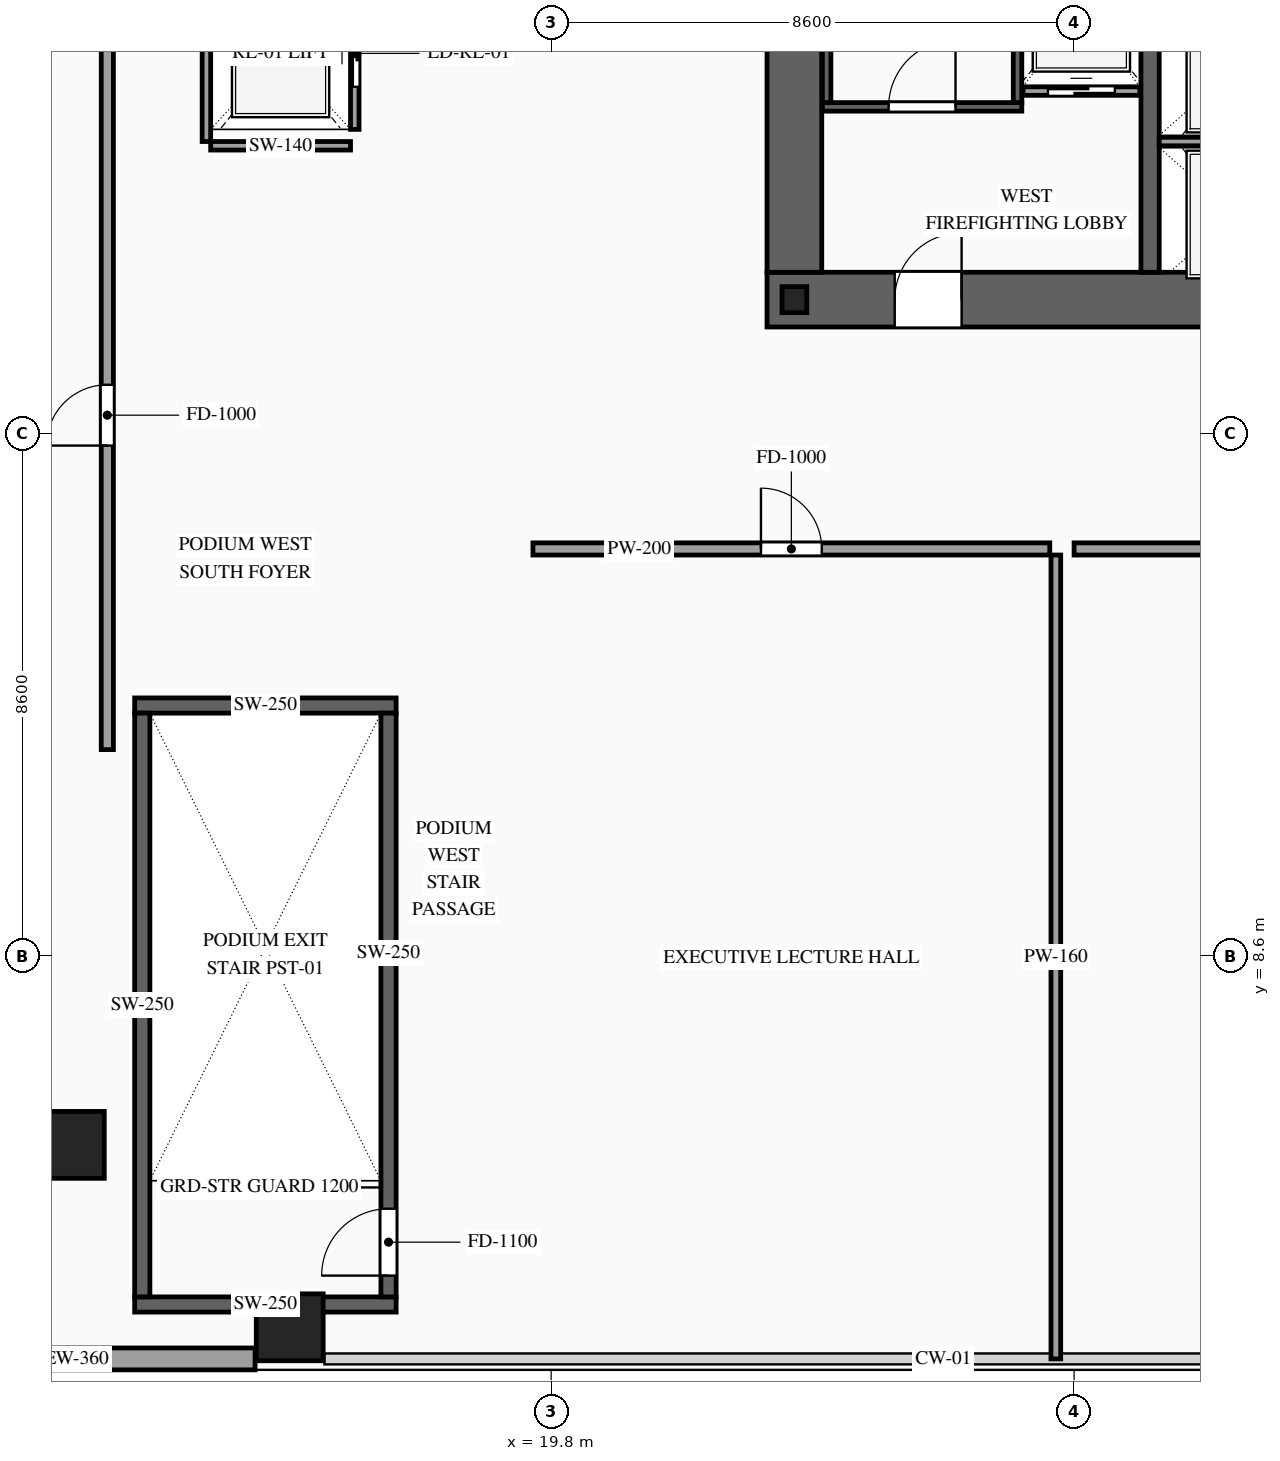
"""IFC4 building model, lengths in metres.
Left out: names, types, materials, properties, quantities, classifications, styles, units other than length and angle.
Written with IfcOpenShell. Run it as: python <this file> out.ifc"""

import sys

from ifc_helpers import new_model, si_unit, direction, frame, frame_2d, origin, origin_2d, place, context, subcontext, project, spatial, rectangle, i_section, extrude, source, transform, mapped, element, fill, save


model = new_model("IFC4")
c1 = context("Model", 3, precision=1e-05, world=origin(), true_north=direction((0.0, 1.0)))
c2 = subcontext(c1, "Body", "Model", "MODEL_VIEW")
j1 = project(units=[si_unit("LENGTHUNIT", "METRE"), si_unit("PLANEANGLEUNIT", "RADIAN")], contexts=[c1])
p1 = place(None, origin())
s1 = spatial("IfcSite", under=j1, at=p1, CompositionType="ELEMENT")
p2 = place(p1, origin())
s2 = spatial("IfcBuilding", under=s1, at=p2, CompositionType="ELEMENT")
p3 = place(p2, frame((0.0, 0.0, 25.8)))
s3 = spatial("IfcBuildingStorey", under=s2, at=p3, CompositionType="ELEMENT", Elevation=25.8)
p4 = place(p3, frame((23.35, 19.4, 0.0), z_axis=(0.0, 0.0, 1.0), x_axis=(1.0, 0.0, 0.0)))
e1 = element("IfcWall", 1, at=p4, inside=s3, PredefinedType="SHEAR", context=c2, shape_type="SweptSolid", body=[
    extrude(rectangle(XDim=27.3, YDim=0.9, at=frame_2d((13.65, 0.0))), origin(), (0.0, 0.0, 1.0), 4.8),
])
p5 = place(p4, frame((2.1, 0.0, 0.0)))
e2 = element("IfcOpeningElement", 2, at=p5, cuts=e1, PredefinedType="OPENING", context=c2, shape_type="SweptSolid", body=[
    extrude(rectangle(XDim=1.1, YDim=2.2, at=frame_2d((0.55, 1.1))), frame((0.0, 0.465, 0.0), z_axis=(0.0, -1.0, 0.0), x_axis=(1.0, 0.0, 0.0)), (0.0, 0.0, 1.0), 0.93),
])
p6 = place(p4, frame((10.0, 0.0, 0.0)))
e3 = element("IfcOpeningElement", 3, at=p6, cuts=e1, PredefinedType="OPENING", context=c2, shape_type="SweptSolid", body=[
    extrude(rectangle(XDim=1.1, YDim=2.2, at=frame_2d((0.55, 1.1))), frame((0.0, 0.465, 0.0), z_axis=(0.0, -1.0, 0.0), x_axis=(1.0, 0.0, 0.0)), (0.0, 0.0, 1.0), 0.93),
])
p7 = place(p4, frame((23.2, 0.0, 0.0)))
e4 = element("IfcOpeningElement", 4, at=p7, cuts=e1, PredefinedType="OPENING", context=c2, shape_type="SweptSolid", body=[
    extrude(rectangle(XDim=1.1, YDim=2.2, at=frame_2d((0.55, 1.1))), frame((0.0, 0.465, 0.0), z_axis=(0.0, -1.0, 0.0), x_axis=(1.0, 0.0, 0.0)), (0.0, 0.0, 1.0), 0.93),
])
p8 = place(p4, frame((19.82, 0.0, 0.0)))
e5 = element("IfcOpeningElement", 5, at=p8, cuts=e1, PredefinedType="OPENING", context=c2, shape_type="SweptSolid", body=[
    extrude(rectangle(XDim=0.9, YDim=2.15, at=frame_2d((0.45, 1.075))), frame((0.0, 0.465, 0.0), z_axis=(0.0, -1.0, 0.0), x_axis=(1.0, 0.0, 0.0)), (0.0, 0.0, 1.0), 0.93),
])
p9 = place(p4, frame((18.38, 0.0, 0.0)))
e6 = element("IfcOpeningElement", 6, at=p9, cuts=e1, PredefinedType="OPENING", context=c2, shape_type="SweptSolid", body=[
    extrude(rectangle(XDim=0.9, YDim=2.15, at=frame_2d((0.45, 1.075))), frame((0.0, 0.465, 0.0), z_axis=(0.0, -1.0, 0.0), x_axis=(1.0, 0.0, 0.0)), (0.0, 0.0, 1.0), 0.93),
])
m1 = source(origin(), c2, "Body", "SweptSolid", [
    extrude(rectangle(XDim=11.9, YDim=0.9, at=frame_2d((5.95, 0.0))), origin(), (0.0, 0.0, 1.0), 4.8),
])
p10 = place(p3, frame((23.8, 19.85, 0.0), z_axis=(0.0, 0.0, 1.0), x_axis=(0.0, 1.0, 0.0)))
e7 = element("IfcWall", 7, at=p10, inside=s3, PredefinedType="SHEAR", context=c2, shape_type="MappedRepresentation", body=[
    mapped(m1, transform((0.0, 0.0, 0.0), scale=1.0)),
])
m2 = source(origin(), c2, "Body", "SweptSolid", [
    extrude(rectangle(XDim=11.9, YDim=0.3, at=frame_2d((5.95, 0.0))), origin(), (0.0, 0.0, 1.0), 4.8),
])
p11 = place(p3, frame((29.65, 19.85, 0.0), z_axis=(0.0, 0.0, 1.0), x_axis=(0.0, 1.0, 0.0)))
e8 = element("IfcWall", 8, at=p11, inside=s3, PredefinedType="SOLIDWALL", context=c2, shape_type="MappedRepresentation", body=[
    mapped(m2, transform((0.0, 0.0, 0.0), scale=1.0)),
])
m3 = source(origin(), c2, "Body", "SweptSolid", [
    extrude(i_section(OverallWidth=0.407, OverallDepth=0.428, WebThickness=0.02, FlangeThickness=0.035, at=origin_2d()), origin(), (0.0, 0.0, 1.0), 4.8),
])
p12 = place(p3, frame((23.8, 19.4, 0.0), z_axis=(0.0, 0.0, 1.0), x_axis=(1.0, 0.0, 0.0)))
e9 = element("IfcColumn", 9, at=p12, inside=s3, PredefinedType="COLUMN", context=c2, shape_type="MappedRepresentation", body=[
    mapped(m3, transform((0.0, 0.0, 0.0), scale=1.0)),
])
m4 = source(origin(), c2, "Body", "SweptSolid", [
    extrude(rectangle(XDim=1.1, YDim=1.1, at=origin_2d()), origin(), (0.0, 0.0, 1.0), 4.8),
])
for number, where, z_axis, x_axis in (
    (10, (11.9, 5.5, 0.0), (0.0, 0.0, 1.0), (1.0, 0.0, 0.0)),
    (11, (15.5, 2.5, 0.0), (0.0, 0.0, 1.0), (1.0, 0.0, 0.0)),
):
    element("IfcColumn", number, at=place(p3, frame(where, z_axis=z_axis, x_axis=x_axis)), inside=s3, PredefinedType="COLUMN", context=c2, shape_type="MappedRepresentation", body=[
        mapped(m4, transform((0.0, 0.0, 0.0), scale=1.0)),
    ])
p13 = place(p3, frame((2.0, 1.98, 0.0), z_axis=(0.0, 0.0, 1.0), x_axis=(1.0, 0.0, 0.0)))
e12 = element("IfcWall", 12, at=p13, inside=s3, PredefinedType="SOLIDWALL", context=c2, shape_type="SweptSolid", body=[
    extrude(rectangle(XDim=12.93, YDim=0.36, at=frame_2d((6.465, 0.0))), origin(), (0.0, 0.0, 1.0), 4.5),
])
p14 = place(p13, frame((4.4, 0.0, 0.85)))
e13 = element("IfcOpeningElement", 13, at=p14, cuts=e12, PredefinedType="OPENING", context=c2, shape_type="SweptSolid", body=[
    extrude(rectangle(XDim=2.4, YDim=2.4, at=frame_2d((1.2, 1.2))), frame((0.0, 0.195, 0.0), z_axis=(0.0, -1.0, 0.0), x_axis=(1.0, 0.0, 0.0)), (0.0, 0.0, 1.0), 0.39),
])
p15 = place(p3, frame((27.56, 22.83, 0.0), z_axis=(0.0, 0.0, 1.0), x_axis=(1.0, 0.0, 0.0)))
e14 = element("IfcWall", 14, at=p15, inside=s3, PredefinedType="SOLIDWALL", context=c2, shape_type="SweptSolid", body=[
    extrude(rectangle(XDim=1.92, YDim=0.14, at=frame_2d((0.96, 0.0))), origin(), (0.0, 0.0, 1.0), 4.5),
])
p16 = place(p15, frame((0.41, 0.0, 0.0)))
e15 = element("IfcOpeningElement", 15, at=p16, cuts=e14, PredefinedType="OPENING", context=c2, shape_type="SweptSolid", body=[
    extrude(rectangle(XDim=1.1, YDim=2.2, at=frame_2d((0.55, 1.1))), frame((0.0, 0.085, 0.0), z_axis=(0.0, -1.0, 0.0), x_axis=(1.0, 0.0, 0.0)), (0.0, 0.0, 1.0), 0.17),
])
m5 = source(origin(), c2, "Body", "SweptSolid", [
    extrude(rectangle(XDim=2.5, YDim=0.14, at=frame_2d((1.25, 0.0))), origin(), (0.0, 0.0, 1.0), 4.5),
])
p17 = place(p3, frame((29.8, 22.0, 0.0), z_axis=(0.0, 0.0, 1.0), x_axis=(1.0, 0.0, 0.0)))
e16 = element("IfcWall", 16, at=p17, inside=s3, PredefinedType="SOLIDWALL", context=c2, shape_type="MappedRepresentation", body=[
    mapped(m5, transform((0.0, 0.0, 0.0), scale=1.0)),
])
p18 = place(p3, frame((16.57, 22.2, 0.0), z_axis=(0.0, 0.0, 1.0), x_axis=(0.0, 1.0, 0.0)))
e17 = element("IfcWall", 17, at=p18, inside=s3, PredefinedType="SOLIDWALL", context=c2, shape_type="SweptSolid", body=[
    extrude(rectangle(XDim=2.5, YDim=0.14, at=frame_2d((1.25, 0.0))), origin(), (0.0, 0.0, 1.0), 4.5),
])
p19 = place(p18, frame((0.7, 0.0, 0.0)))
e18 = element("IfcOpeningElement", 18, at=p19, cuts=e17, PredefinedType="OPENING", context=c2, shape_type="SweptSolid", body=[
    extrude(rectangle(XDim=1.1, YDim=2.2, at=frame_2d((0.55, 1.1))), frame((0.0, 0.085, 0.0), z_axis=(0.0, -1.0, 0.0), x_axis=(1.0, 0.0, 0.0)), (0.0, 0.0, 1.0), 0.17),
])
m6 = source(origin(), c2, "Body", "SweptSolid", [
    extrude(rectangle(XDim=5.8, YDim=0.14, at=frame_2d((2.9, 0.0))), origin(), (0.0, 0.0, 1.0), 4.5),
])
p20 = place(p3, frame((14.13, 22.0, 0.0), z_axis=(0.0, 0.0, 1.0), x_axis=(0.0, 1.0, 0.0)))
e19 = element("IfcWall", 19, at=p20, inside=s3, PredefinedType="SOLIDWALL", context=c2, shape_type="MappedRepresentation", body=[
    mapped(m6, transform((0.0, 0.0, 0.0), scale=1.0)),
])
m7 = source(origin(), c2, "Body", "SweptSolid", [
    extrude(rectangle(XDim=2.3, YDim=0.14, at=frame_2d((1.15, 0.0))), origin(), (0.0, 0.0, 1.0), 4.5),
])
p21 = place(p3, frame((14.2, 21.93, 0.0), z_axis=(0.0, 0.0, 1.0), x_axis=(1.0, 0.0, 0.0)))
e20 = element("IfcWall", 20, at=p21, inside=s3, PredefinedType="SOLIDWALL", context=c2, shape_type="MappedRepresentation", body=[
    mapped(m7, transform((0.0, 0.0, 0.0), scale=1.0)),
])
p22 = place(p3, frame((24.26, 22.57, 0.0), z_axis=(0.0, 0.0, 1.0), x_axis=(1.0, 0.0, 0.0)))
e21 = element("IfcWall", 21, at=p22, inside=s3, PredefinedType="SOLIDWALL", context=c2, shape_type="SweptSolid", body=[
    extrude(rectangle(XDim=3.28, YDim=0.14, at=frame_2d((1.64, 0.0))), origin(), (0.0, 0.0, 1.0), 4.5),
])
p23 = place(p22, frame((1.09, 0.0, 0.0)))
e22 = element("IfcOpeningElement", 22, at=p23, cuts=e21, PredefinedType="OPENING", context=c2, shape_type="SweptSolid", body=[
    extrude(rectangle(XDim=1.1, YDim=2.2, at=frame_2d((0.55, 1.1))), frame((0.0, 0.085, 0.0), z_axis=(0.0, -1.0, 0.0), x_axis=(1.0, 0.0, 0.0)), (0.0, 0.0, 1.0), 0.17),
])
m8 = source(origin(), c2, "Body", "SweptSolid", [
    extrude(rectangle(XDim=8.94, YDim=0.14, at=frame_2d((4.47, 0.0))), origin(), (0.0, 0.0, 1.0), 4.5),
])
for number, where, z_axis, x_axis in (
    (23, (24.33, 22.64, 0.0), (0.0, 0.0, 1.0), (0.0, 1.0, 0.0)),
    (24, (27.47, 22.64, 0.0), (0.0, 0.0, 1.0), (0.0, 1.0, 0.0)),
):
    element("IfcWall", number, at=place(p3, frame(where, z_axis=z_axis, x_axis=x_axis)), inside=s3, PredefinedType="SOLIDWALL", context=c2, shape_type="MappedRepresentation", body=[
        mapped(m8, transform((0.0, 0.0, 0.0), scale=1.0)),
    ])
m9 = source(origin(), c2, "Body", "SweptSolid", [
    extrude(rectangle(XDim=4.3, YDim=0.25, at=frame_2d((2.15, 0.0))), origin(), (0.0, 0.0, 1.0), 4.5),
])
for number, where, z_axis, x_axis in (
    (25, (12.95, 2.875, 0.0), (0.0, 0.0, 1.0), (1.0, 0.0, 0.0)),
    (26, (12.95, 12.725, 0.0), (0.0, 0.0, 1.0), (1.0, 0.0, 0.0)),
):
    element("IfcWall", number, at=place(p3, frame(where, z_axis=z_axis, x_axis=x_axis)), inside=s3, PredefinedType="SOLIDWALL", context=c2, shape_type="MappedRepresentation", body=[
        mapped(m9, transform((0.0, 0.0, 0.0), scale=1.0)),
    ])
m10 = source(origin(), c2, "Body", "SweptSolid", [
    extrude(rectangle(XDim=9.6, YDim=0.25, at=frame_2d((4.8, 0.0))), origin(), (0.0, 0.0, 1.0), 4.5),
])
p24 = place(p3, frame((13.075, 3.0, 0.0), z_axis=(0.0, 0.0, 1.0), x_axis=(0.0, 1.0, 0.0)))
e27 = element("IfcWall", 27, at=p24, inside=s3, PredefinedType="SOLIDWALL", context=c2, shape_type="MappedRepresentation", body=[
    mapped(m10, transform((0.0, 0.0, 0.0), scale=1.0)),
])
p25 = place(p3, frame((17.125, 3.0, 0.0), z_axis=(0.0, 0.0, 1.0), x_axis=(0.0, 1.0, 0.0)))
e28 = element("IfcWall", 28, at=p25, inside=s3, PredefinedType="SOLIDWALL", context=c2, shape_type="SweptSolid", body=[
    extrude(rectangle(XDim=9.6, YDim=0.25, at=frame_2d((4.8, 0.0))), origin(), (0.0, 0.0, 1.0), 4.5),
])
p26 = place(p25, frame((0.35, 0.0, 0.0)))
e29 = element("IfcOpeningElement", 29, at=p26, cuts=e28, PredefinedType="OPENING", context=c2, shape_type="SweptSolid", body=[
    extrude(rectangle(XDim=1.1, YDim=2.2, at=frame_2d((0.55, 1.1))), frame((0.0, 0.14, 0.0), z_axis=(0.0, -1.0, 0.0), x_axis=(1.0, 0.0, 0.0)), (0.0, 0.0, 1.0), 0.28),
])
p27 = place(p3, frame((19.5, 15.3, 0.0), z_axis=(0.0, 0.0, 1.0), x_axis=(1.0, 0.0, 0.0)))
e30 = element("IfcWall", 30, at=p27, inside=s3, PredefinedType="PARTITIONING", context=c2, shape_type="SweptSolid", body=[
    extrude(rectangle(XDim=8.5, YDim=0.2, at=frame_2d((4.25, 0.0))), origin(), (0.0, 0.0, 1.0), 4.5),
])
p28 = place(p27, frame((3.75, 0.0, 0.0)))
e31 = element("IfcOpeningElement", 31, at=p28, cuts=e30, PredefinedType="OPENING", context=c2, shape_type="SweptSolid", body=[
    extrude(rectangle(XDim=1.0, YDim=2.2, at=frame_2d((0.5, 1.1))), frame((0.0, 0.115, 0.0), z_axis=(0.0, -1.0, 0.0), x_axis=(1.0, 0.0, 0.0)), (0.0, 0.0, 1.0), 0.23),
])
m11 = source(origin(), c2, "Body", "SweptSolid", [
    extrude(rectangle(XDim=13.22, YDim=0.16, at=frame_2d((6.61, 0.0))), origin(), (0.0, 0.0, 1.0), 4.5),
])
p29 = place(p3, frame((28.1, 1.98, 0.0), z_axis=(0.0, 0.0, 1.0), x_axis=(0.0, 1.0, 0.0)))
e32 = element("IfcWall", 32, at=p29, inside=s3, PredefinedType="PARTITIONING", context=c2, shape_type="MappedRepresentation", body=[
    mapped(m11, transform((0.0, 0.0, 0.0), scale=1.0)),
])
p30 = place(p3, frame((28.4, 15.3, 0.0), z_axis=(0.0, 0.0, 1.0), x_axis=(1.0, 0.0, 0.0)))
e33 = element("IfcWall", 33, at=p30, inside=s3, PredefinedType="PARTITIONING", context=c2, shape_type="SweptSolid", body=[
    extrude(rectangle(XDim=8.4, YDim=0.2, at=frame_2d((4.2, 0.0))), origin(), (0.0, 0.0, 1.0), 4.5),
])
p31 = place(p30, frame((3.7, 0.0, 0.0)))
e34 = element("IfcOpeningElement", 34, at=p31, cuts=e33, PredefinedType="OPENING", context=c2, shape_type="SweptSolid", body=[
    extrude(rectangle(XDim=1.0, YDim=2.2, at=frame_2d((0.5, 1.1))), frame((0.0, 0.115, 0.0), z_axis=(0.0, -1.0, 0.0), x_axis=(1.0, 0.0, 0.0)), (0.0, 0.0, 1.0), 0.23),
])
p32 = place(p3, frame((12.5, 12.0, 0.0), z_axis=(0.0, 0.0, 1.0), x_axis=(0.0, 1.0, 0.0)))
e35 = element("IfcWall", 35, at=p32, inside=s3, PredefinedType="PARTITIONING", context=c2, shape_type="SweptSolid", body=[
    extrude(rectangle(XDim=11.8, YDim=0.2, at=frame_2d((5.9, 0.0))), origin(), (0.0, 0.0, 1.0), 4.5),
])
p33 = place(p32, frame((5.0, 0.0, 0.0)))
e36 = element("IfcOpeningElement", 36, at=p33, cuts=e35, PredefinedType="OPENING", context=c2, shape_type="SweptSolid", body=[
    extrude(rectangle(XDim=1.0, YDim=2.2, at=frame_2d((0.5, 1.1))), frame((0.0, 0.115, 0.0), z_axis=(0.0, -1.0, 0.0), x_axis=(1.0, 0.0, 0.0)), (0.0, 0.0, 1.0), 0.23),
])
m12 = source(origin(), c2, "Body", "SweptSolid", [
    extrude(rectangle(XDim=1.1, YDim=2.2, at=frame_2d((0.55, 1.1))), frame((0.0, 0.025, 0.0), z_axis=(0.0, -1.0, 0.0), x_axis=(1.0, 0.0, 0.0)), (0.0, 0.0, 1.0), 0.05),
])
p34 = place(p16, origin())
e37 = element("IfcDoor", 37, at=p34, inside=s3, OperationType="SLIDING_TO_LEFT", PredefinedType="DOOR", context=c2, shape_type="MappedRepresentation", body=[
    mapped(m12, transform((0.0, 0.0, 0.0), scale=1.0)),
])
fill(e15, e37)
p35 = place(p19, origin())
e38 = element("IfcDoor", 38, at=p35, inside=s3, OperationType="SLIDING_TO_RIGHT", PredefinedType="DOOR", context=c2, shape_type="MappedRepresentation", body=[
    mapped(m12, transform((0.0, 0.0, 0.0), scale=1.0)),
])
fill(e18, e38)
m13 = source(origin(), c2, "Body", "SweptSolid", [
    extrude(rectangle(XDim=1.1, YDim=2.2, at=frame_2d((0.55, 1.1))), frame((0.0, 0.025, 0.0), z_axis=(0.0, -1.0, 0.0), x_axis=(1.0, 0.0, 0.0)), (0.0, 0.0, 1.0), 0.05),
])
p36 = place(p23, origin())
e39 = element("IfcDoor", 39, at=p36, inside=s3, OperationType="SINGLE_SWING_RIGHT", PredefinedType="DOOR", context=c2, shape_type="MappedRepresentation", body=[
    mapped(m13, transform((0.0, 0.0, 0.0), scale=1.0)),
])
fill(e22, e39)
p37 = place(p26, origin())
e40 = element("IfcDoor", 40, at=p37, inside=s3, OperationType="SINGLE_SWING_LEFT", PredefinedType="DOOR", context=c2, shape_type="MappedRepresentation", body=[
    mapped(m13, transform((0.0, 0.0, 0.0), scale=1.0)),
])
fill(e29, e40)
p38 = place(p5, origin())
e41 = element("IfcDoor", 41, at=p38, inside=s3, OperationType="SINGLE_SWING_RIGHT", PredefinedType="DOOR", context=c2, shape_type="MappedRepresentation", body=[
    mapped(m13, transform((0.0, 0.0, 0.0), scale=1.0)),
])
fill(e2, e41)
m14 = source(origin(), c2, "Body", "SweptSolid", [
    extrude(rectangle(XDim=1.0, YDim=2.2, at=frame_2d((0.5, 1.1))), frame((0.0, 0.025, 0.0), z_axis=(0.0, -1.0, 0.0), x_axis=(1.0, 0.0, 0.0)), (0.0, 0.0, 1.0), 0.05),
])
p39 = place(p28, origin())
e42 = element("IfcDoor", 42, at=p39, inside=s3, OperationType="SINGLE_SWING_LEFT", PredefinedType="DOOR", context=c2, shape_type="MappedRepresentation", body=[
    mapped(m14, transform((0.0, 0.0, 0.0), scale=1.0)),
])
fill(e31, e42)
p40 = place(p33, origin())
e43 = element("IfcDoor", 43, at=p40, inside=s3, OperationType="SINGLE_SWING_LEFT", PredefinedType="DOOR", context=c2, shape_type="MappedRepresentation", body=[
    mapped(m14, transform((0.0, 0.0, 0.0), scale=1.0)),
])
fill(e36, e43)
save(model, sys.argv[1])
